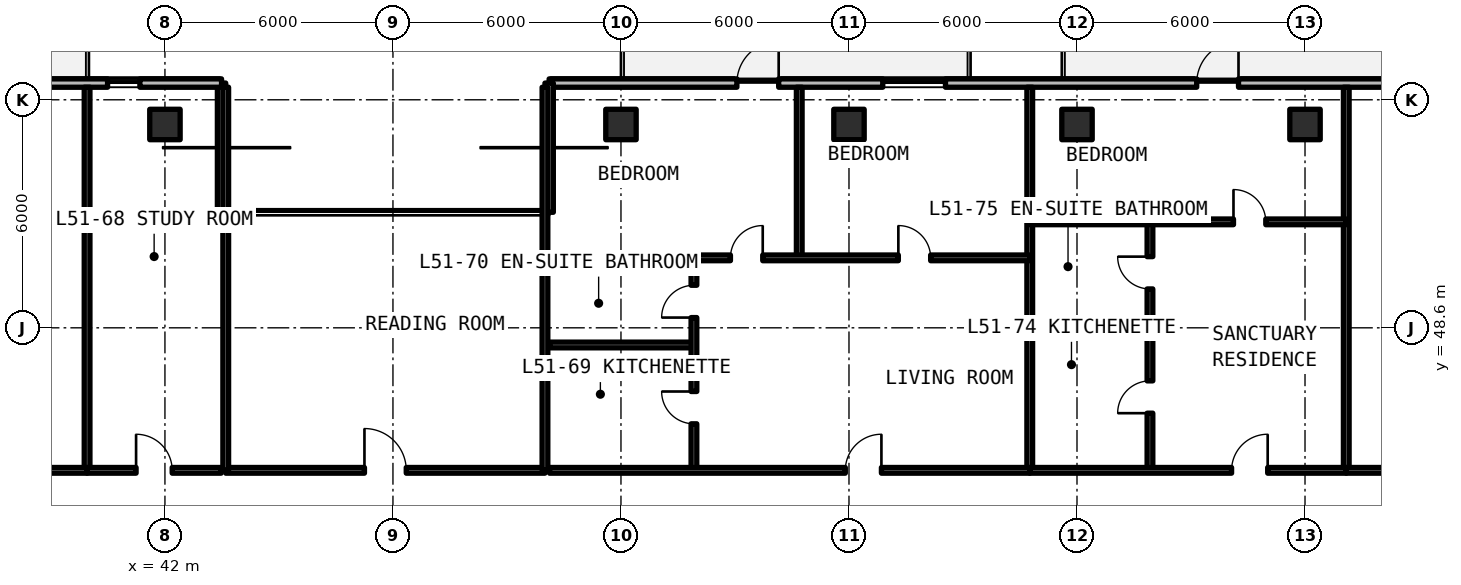
"""IFC4 building model, lengths in metres.
Left out: names, types, materials, properties, quantities, classifications, styles, units other than length and angle.
Written with IfcOpenShell. Run it as: python <this file> out.ifc"""

import sys

from ifc_helpers import new_model, si_unit, direction, frame, frame_2d, origin, origin_2d, place, context, subcontext, project, spatial, rectangle, extrude, element, fill, save


model = new_model("IFC4")
c1 = context("Model", 3, precision=1e-05, world=origin(), true_north=direction((0.0, 1.0)))
c2 = subcontext(c1, "Body", "Model", "MODEL_VIEW")
j1 = project(units=[si_unit("LENGTHUNIT", "METRE"), si_unit("PLANEANGLEUNIT", "RADIAN")], contexts=[c1])
p1 = place(None, origin())
s1 = spatial("IfcSite", under=j1, at=p1, CompositionType="ELEMENT")
p2 = place(p1, origin())
s2 = spatial("IfcBuilding", under=s1, at=p2, CompositionType="ELEMENT")
p3 = place(p2, frame((0.0, 0.0, 185.13)))
s3 = spatial("IfcBuildingStorey", under=s2, at=p3, CompositionType="ELEMENT", Elevation=185.13)
for number, where, z_axis, x_axis in (
    (1, (42.0, 53.95, 0.0), (0.0, 0.0, 1.0), (1.0, 0.0, 0.0)),
    (2, (54.0, 53.95, 0.0), (0.0, 0.0, 1.0), (1.0, 0.0, 0.0)),
    (3, (60.0, 53.95, 0.0), (0.0, 0.0, 1.0), (1.0, 0.0, 0.0)),
    (4, (66.0, 53.95, 0.0), (0.0, 0.0, 1.0), (1.0, 0.0, 0.0)),
    (5, (72.0, 53.95, 0.0), (0.0, 0.0, 1.0), (1.0, 0.0, 0.0)),
):
    element("IfcColumn", number, at=place(p3, frame(where, z_axis=z_axis, x_axis=x_axis)), inside=s3, PredefinedType="COLUMN", context=c2, shape_type="SweptSolid", body=[
        extrude(rectangle(XDim=0.8, YDim=0.8, at=origin_2d()), origin(), (0.0, 0.0, 1.0), 3.3),
    ])
p4 = place(p3, frame((95.354, 55.04, 0.0), z_axis=(0.0, 0.0, 1.0), x_axis=(-1.0, 0.0, 0.0)))
e6 = element("IfcWall", 6, at=p4, inside=s3, PredefinedType="SOLIDWALL", context=c2, shape_type="SweptSolid", body=[
    extrude(rectangle(XDim=43.244, YDim=0.22, at=frame_2d((21.622, 0.0))), origin(), (0.0, 0.0, 1.0), 3.08),
])
p5 = place(p4, frame((37.204, 0.0, 0.0)))
e7 = element("IfcOpeningElement", 7, at=p5, cuts=e6, PredefinedType="OPENING", context=c2, shape_type="SweptSolid", body=[
    extrude(rectangle(XDim=1.1, YDim=2.15, at=frame_2d((0.55, 1.075))), frame((0.0, 0.12, 0.0), z_axis=(0.0, -1.0, 0.0), x_axis=(1.0, 0.0, 0.0)), (0.0, 0.0, 1.0), 0.24),
])
p6 = place(p4, frame((25.104, 0.0, 0.0)))
e8 = element("IfcOpeningElement", 8, at=p6, cuts=e6, PredefinedType="OPENING", context=c2, shape_type="SweptSolid", body=[
    extrude(rectangle(XDim=1.1, YDim=2.15, at=frame_2d((0.55, 1.075))), frame((0.0, 0.12, 0.0), z_axis=(0.0, -1.0, 0.0), x_axis=(1.0, 0.0, 0.0)), (0.0, 0.0, 1.0), 0.24),
])
p7 = place(p4, frame((13.254, 0.0, 0.0)))
e9 = element("IfcOpeningElement", 9, at=p7, cuts=e6, PredefinedType="OPENING", context=c2, shape_type="SweptSolid", body=[
    extrude(rectangle(XDim=1.1, YDim=2.15, at=frame_2d((0.55, 1.075))), frame((0.0, 0.12, 0.0), z_axis=(0.0, -1.0, 0.0), x_axis=(1.0, 0.0, 0.0)), (0.0, 0.0, 1.0), 0.24),
])
p8 = place(p4, frame((32.815, 0.0, 0.78)))
e10 = element("IfcOpeningElement", 10, at=p8, cuts=e6, PredefinedType="OPENING", context=c2, shape_type="SweptSolid", body=[
    extrude(rectangle(XDim=1.65, YDim=1.66, at=frame_2d((0.825, 0.83))), frame((0.0, 0.12, 0.0), z_axis=(0.0, -1.0, 0.0), x_axis=(1.0, 0.0, 0.0)), (0.0, 0.0, 1.0), 0.24),
])
p9 = place(p4, frame((8.458, 0.0, 0.78)))
e11 = element("IfcOpeningElement", 11, at=p9, cuts=e6, PredefinedType="OPENING", context=c2, shape_type="SweptSolid", body=[
    extrude(rectangle(XDim=1.65, YDim=1.66, at=frame_2d((0.825, 0.83))), frame((0.0, 0.12, 0.0), z_axis=(0.0, -1.0, 0.0), x_axis=(1.0, 0.0, 0.0)), (0.0, 0.0, 1.0), 0.24),
])
p10 = place(p4, frame((2.303, 0.0, 0.78)))
e12 = element("IfcOpeningElement", 12, at=p10, cuts=e6, PredefinedType="OPENING", context=c2, shape_type="SweptSolid", body=[
    extrude(rectangle(XDim=1.65, YDim=1.66, at=frame_2d((0.825, 0.83))), frame((0.0, 0.12, 0.0), z_axis=(0.0, -1.0, 0.0), x_axis=(1.0, 0.0, 0.0)), (0.0, 0.0, 1.0), 0.24),
])
for number, where, z_axis, x_axis in (
    (13, (52.11, 55.04, 0.0), (0.0, 0.0, 1.0), (0.0, -1.0, 0.0)),
    (14, (43.49, 51.64, 0.0), (0.0, 0.0, 1.0), (0.0, 1.0, 0.0)),
):
    element("IfcWall", number, at=place(p3, frame(where, z_axis=z_axis, x_axis=x_axis)), inside=s3, PredefinedType="SOLIDWALL", context=c2, shape_type="SweptSolid", body=[
        extrude(rectangle(XDim=3.4, YDim=0.22, at=frame_2d((1.7, 0.0))), origin(), (0.0, 0.0, 1.0), 3.08),
    ])
p11 = place(p3, frame((43.49, 55.04, 0.0), z_axis=(0.0, 0.0, 1.0), x_axis=(-1.0, 0.0, 0.0)))
e15 = element("IfcWall", 15, at=p11, inside=s3, PredefinedType="SOLIDWALL", context=c2, shape_type="SweptSolid", body=[
    extrude(rectangle(XDim=17.644, YDim=0.22, at=frame_2d((8.822, 0.0))), origin(), (0.0, 0.0, 1.0), 3.08),
])
p12 = place(p11, frame((10.29, 0.0, 0.0)))
e16 = element("IfcOpeningElement", 16, at=p12, cuts=e15, PredefinedType="OPENING", context=c2, shape_type="SweptSolid", body=[
    extrude(rectangle(XDim=1.1, YDim=2.15, at=frame_2d((0.55, 1.075))), frame((0.0, 0.12, 0.0), z_axis=(0.0, -1.0, 0.0), x_axis=(1.0, 0.0, 0.0)), (0.0, 0.0, 1.0), 0.24),
])
p13 = place(p11, frame((14.901, 0.0, 0.78)))
e17 = element("IfcOpeningElement", 17, at=p13, cuts=e15, PredefinedType="OPENING", context=c2, shape_type="SweptSolid", body=[
    extrude(rectangle(XDim=1.65, YDim=1.66, at=frame_2d((0.825, 0.83))), frame((0.0, 0.12, 0.0), z_axis=(0.0, -1.0, 0.0), x_axis=(1.0, 0.0, 0.0)), (0.0, 0.0, 1.0), 0.24),
])
p14 = place(p11, frame((4.969, 0.0, 0.78)))
e18 = element("IfcOpeningElement", 18, at=p14, cuts=e15, PredefinedType="OPENING", context=c2, shape_type="SweptSolid", body=[
    extrude(rectangle(XDim=1.65, YDim=1.66, at=frame_2d((0.825, 0.83))), frame((0.0, 0.12, 0.0), z_axis=(0.0, -1.0, 0.0), x_axis=(1.0, 0.0, 0.0)), (0.0, 0.0, 1.0), 0.24),
])
p15 = place(p11, frame((2.149, 0.0, 0.78)))
e19 = element("IfcOpeningElement", 19, at=p15, cuts=e15, PredefinedType="OPENING", context=c2, shape_type="SweptSolid", body=[
    extrude(rectangle(XDim=0.85, YDim=1.65, at=frame_2d((0.425, 0.825))), frame((0.0, 0.12, 0.0), z_axis=(0.0, -1.0, 0.0), x_axis=(1.0, 0.0, 0.0)), (0.0, 0.0, 1.0), 0.24),
])
p16 = place(p3, frame((43.6, 44.85, 0.0), z_axis=(0.0, 0.0, 1.0), x_axis=(1.0, 0.0, 0.0)))
e20 = element("IfcWall", 20, at=p16, inside=s3, PredefinedType="SOLIDWALL", context=c2, shape_type="SweptSolid", body=[
    extrude(rectangle(XDim=8.4, YDim=0.15, at=frame_2d((4.2, 0.0))), origin(), (0.0, 0.0, 1.0), 2.35),
])
p17 = place(p16, frame((3.65, 0.0, 0.0)))
e21 = element("IfcOpeningElement", 21, at=p17, cuts=e20, PredefinedType="OPENING", context=c2, shape_type="SweptSolid", body=[
    extrude(rectangle(XDim=1.1, YDim=2.15, at=frame_2d((0.55, 1.075))), frame((0.0, 0.085, 0.0), z_axis=(0.0, -1.0, 0.0), x_axis=(1.0, 0.0, 0.0)), (0.0, 0.0, 1.0), 0.17),
])
for number, where, z_axis, x_axis in (
    (22, (43.6, 44.85, 0.0), (0.0, 0.0, 1.0), (0.0, 1.0, 0.0)),
    (23, (52.0, 44.85, 0.0), (0.0, 0.0, 1.0), (0.0, 1.0, 0.0)),
    (24, (39.951, 44.85, 0.0), (0.0, 0.0, 1.0), (0.0, 1.0, 0.0)),
):
    element("IfcWall", number, at=place(p3, frame(where, z_axis=z_axis, x_axis=x_axis)), inside=s3, PredefinedType="SOLIDWALL", context=c2, shape_type="SweptSolid", body=[
        extrude(rectangle(XDim=10.08, YDim=0.15, at=frame_2d((5.04, 0.0))), origin(), (0.0, 0.0, 1.0), 2.35),
    ])
p18 = place(p3, frame((33.842, 44.85, 0.0), z_axis=(0.0, 0.0, 1.0), x_axis=(1.0, 0.0, 0.0)))
e25 = element("IfcWall", 25, at=p18, inside=s3, PredefinedType="SOLIDWALL", context=c2, shape_type="SweptSolid", body=[
    extrude(rectangle(XDim=6.11, YDim=0.15, at=frame_2d((3.055, 0.0))), origin(), (0.0, 0.0, 1.0), 2.35),
])
p19 = place(p18, frame((2.58, 0.0, 0.0)))
e26 = element("IfcOpeningElement", 26, at=p19, cuts=e25, PredefinedType="OPENING", context=c2, shape_type="SweptSolid", body=[
    extrude(rectangle(XDim=0.95, YDim=2.15, at=frame_2d((0.475, 1.075))), frame((0.0, 0.085, 0.0), z_axis=(0.0, -1.0, 0.0), x_axis=(1.0, 0.0, 0.0)), (0.0, 0.0, 1.0), 0.17),
])
p20 = place(p3, frame((39.951, 44.85, 0.0), z_axis=(0.0, 0.0, 1.0), x_axis=(1.0, 0.0, 0.0)))
e27 = element("IfcWall", 27, at=p20, inside=s3, PredefinedType="SOLIDWALL", context=c2, shape_type="SweptSolid", body=[
    extrude(rectangle(XDim=3.529, YDim=0.15, at=frame_2d((1.764, 0.0))), origin(), (0.0, 0.0, 1.0), 2.35),
])
p21 = place(p20, frame((1.289, 0.0, 0.0)))
e28 = element("IfcOpeningElement", 28, at=p21, cuts=e27, PredefinedType="OPENING", context=c2, shape_type="SweptSolid", body=[
    extrude(rectangle(XDim=0.95, YDim=2.15, at=frame_2d((0.475, 1.075))), frame((0.0, 0.085, 0.0), z_axis=(0.0, -1.0, 0.0), x_axis=(1.0, 0.0, 0.0)), (0.0, 0.0, 1.0), 0.17),
])
p22 = place(p3, frame((64.757, 44.85, 0.0), z_axis=(0.0, 0.0, 1.0), x_axis=(0.0, 1.0, 0.0)))
e29 = element("IfcWall", 29, at=p22, inside=s3, PredefinedType="SOLIDWALL", context=c2, shape_type="SweptSolid", body=[
    extrude(rectangle(XDim=10.08, YDim=0.15, at=frame_2d((5.04, 0.0))), origin(), (0.0, 0.0, 1.0), 2.35),
])
p23 = place(p3, frame((52.12, 48.148, 0.0), z_axis=(0.0, 0.0, 1.0), x_axis=(1.0, 0.0, 0.0)))
e30 = element("IfcWall", 30, at=p23, inside=s3, PredefinedType="PARTITIONING", context=c2, shape_type="SweptSolid", body=[
    extrude(rectangle(XDim=3.8, YDim=0.15, at=frame_2d((1.9, 0.0))), origin(), (0.0, 0.0, 1.0), 2.35),
])
p24 = place(p3, frame((55.92, 44.85, 0.0), z_axis=(0.0, 0.0, 1.0), x_axis=(0.0, 1.0, 0.0)))
e31 = element("IfcWall", 31, at=p24, inside=s3, PredefinedType="PARTITIONING", context=c2, shape_type="SweptSolid", body=[
    extrude(rectangle(XDim=5.591, YDim=0.15, at=frame_2d((2.795, 0.0))), origin(), (0.0, 0.0, 1.0), 2.35),
])
p25 = place(p24, frame((1.224, 0.0, 0.0)))
e32 = element("IfcOpeningElement", 32, at=p25, cuts=e31, PredefinedType="OPENING", context=c2, shape_type="SweptSolid", body=[
    extrude(rectangle(XDim=0.85, YDim=2.1, at=frame_2d((0.425, 1.05))), frame((0.0, 0.085, 0.0), z_axis=(0.0, -1.0, 0.0), x_axis=(1.0, 0.0, 0.0)), (0.0, 0.0, 1.0), 0.17),
])
p26 = place(p24, frame((4.02, 0.0, 0.0)))
e33 = element("IfcOpeningElement", 33, at=p26, cuts=e31, PredefinedType="OPENING", context=c2, shape_type="SweptSolid", body=[
    extrude(rectangle(XDim=0.85, YDim=2.1, at=frame_2d((0.425, 1.05))), frame((0.0, 0.085, 0.0), z_axis=(0.0, -1.0, 0.0), x_axis=(1.0, 0.0, 0.0)), (0.0, 0.0, 1.0), 0.17),
])
p27 = place(p3, frame((58.691, 50.441, 0.0), z_axis=(0.0, 0.0, 1.0), x_axis=(0.0, 1.0, 0.0)))
e34 = element("IfcWall", 34, at=p27, inside=s3, PredefinedType="PARTITIONING", context=c2, shape_type="SweptSolid", body=[
    extrude(rectangle(XDim=4.489, YDim=0.15, at=frame_2d((2.245, 0.0))), origin(), (0.0, 0.0, 1.0), 2.35),
])
p28 = place(p3, frame((52.12, 50.441, 0.0), z_axis=(0.0, 0.0, 1.0), x_axis=(1.0, 0.0, 0.0)))
e35 = element("IfcWall", 35, at=p28, inside=s3, PredefinedType="PARTITIONING", context=c2, shape_type="SweptSolid", body=[
    extrude(rectangle(XDim=12.637, YDim=0.15, at=frame_2d((6.318, 0.0))), origin(), (0.0, 0.0, 1.0), 2.35),
])
p29 = place(p28, frame((4.76, 0.0, 0.0)))
e36 = element("IfcOpeningElement", 36, at=p29, cuts=e35, PredefinedType="OPENING", context=c2, shape_type="SweptSolid", body=[
    extrude(rectangle(XDim=0.85, YDim=2.1, at=frame_2d((0.425, 1.05))), frame((0.0, 0.085, 0.0), z_axis=(0.0, -1.0, 0.0), x_axis=(1.0, 0.0, 0.0)), (0.0, 0.0, 1.0), 0.17),
])
p30 = place(p28, frame((9.179, 0.0, 0.0)))
e37 = element("IfcOpeningElement", 37, at=p30, cuts=e35, PredefinedType="OPENING", context=c2, shape_type="SweptSolid", body=[
    extrude(rectangle(XDim=0.85, YDim=2.1, at=frame_2d((0.425, 1.05))), frame((0.0, 0.085, 0.0), z_axis=(0.0, -1.0, 0.0), x_axis=(1.0, 0.0, 0.0)), (0.0, 0.0, 1.0), 0.17),
])
p31 = place(p3, frame((52.12, 44.85, 0.0), z_axis=(0.0, 0.0, 1.0), x_axis=(1.0, 0.0, 0.0)))
e38 = element("IfcWall", 38, at=p31, inside=s3, PredefinedType="SOLIDWALL", context=c2, shape_type="SweptSolid", body=[
    extrude(rectangle(XDim=12.637, YDim=0.15, at=frame_2d((6.318, 0.0))), origin(), (0.0, 0.0, 1.0), 2.35),
])
p32 = place(p31, frame((7.783, 0.0, 0.0)))
e39 = element("IfcOpeningElement", 39, at=p32, cuts=e38, PredefinedType="OPENING", context=c2, shape_type="SweptSolid", body=[
    extrude(rectangle(XDim=0.95, YDim=2.15, at=frame_2d((0.475, 1.075))), frame((0.0, 0.085, 0.0), z_axis=(0.0, -1.0, 0.0), x_axis=(1.0, 0.0, 0.0)), (0.0, 0.0, 1.0), 0.17),
])
p33 = place(p3, frame((73.086, 44.85, 0.0), z_axis=(0.0, 0.0, 1.0), x_axis=(0.0, 1.0, 0.0)))
e40 = element("IfcWall", 40, at=p33, inside=s3, PredefinedType="SOLIDWALL", context=c2, shape_type="SweptSolid", body=[
    extrude(rectangle(XDim=10.08, YDim=0.15, at=frame_2d((5.04, 0.0))), origin(), (0.0, 0.0, 1.0), 2.35),
])
p34 = place(p3, frame((64.757, 48.708, 0.0), z_axis=(0.0, 0.0, 1.0), x_axis=(1.0, 0.0, 0.0)))
e41 = element("IfcWall", 41, at=p34, inside=s3, PredefinedType="PARTITIONING", context=c2, shape_type="SweptSolid", body=[
    extrude(rectangle(XDim=3.163, YDim=0.15, at=frame_2d((1.582, 0.0))), origin(), (0.0, 0.0, 1.0), 2.35),
])
p35 = place(p3, frame((67.92, 44.85, 0.0), z_axis=(0.0, 0.0, 1.0), x_axis=(0.0, 1.0, 0.0)))
e42 = element("IfcWall", 42, at=p35, inside=s3, PredefinedType="PARTITIONING", context=c2, shape_type="SweptSolid", body=[
    extrude(rectangle(XDim=6.538, YDim=0.15, at=frame_2d((3.269, 0.0))), origin(), (0.0, 0.0, 1.0), 2.35),
])
p36 = place(p35, frame((1.504, 0.0, 0.0)))
e43 = element("IfcOpeningElement", 43, at=p36, cuts=e42, PredefinedType="OPENING", context=c2, shape_type="SweptSolid", body=[
    extrude(rectangle(XDim=0.85, YDim=2.1, at=frame_2d((0.425, 1.05))), frame((0.0, 0.085, 0.0), z_axis=(0.0, -1.0, 0.0), x_axis=(1.0, 0.0, 0.0)), (0.0, 0.0, 1.0), 0.17),
])
p37 = place(p35, frame((4.773, 0.0, 0.0)))
e44 = element("IfcOpeningElement", 44, at=p37, cuts=e42, PredefinedType="OPENING", context=c2, shape_type="SweptSolid", body=[
    extrude(rectangle(XDim=0.85, YDim=2.1, at=frame_2d((0.425, 1.05))), frame((0.0, 0.085, 0.0), z_axis=(0.0, -1.0, 0.0), x_axis=(1.0, 0.0, 0.0)), (0.0, 0.0, 1.0), 0.17),
])
p38 = place(p3, frame((64.757, 51.388, 0.0), z_axis=(0.0, 0.0, 1.0), x_axis=(1.0, 0.0, 0.0)))
e45 = element("IfcWall", 45, at=p38, inside=s3, PredefinedType="PARTITIONING", context=c2, shape_type="SweptSolid", body=[
    extrude(rectangle(XDim=8.329, YDim=0.15, at=frame_2d((4.165, 0.0))), origin(), (0.0, 0.0, 1.0), 2.35),
])
p39 = place(p38, frame((5.361, 0.0, 0.0)))
e46 = element("IfcOpeningElement", 46, at=p39, cuts=e45, PredefinedType="OPENING", context=c2, shape_type="SweptSolid", body=[
    extrude(rectangle(XDim=0.85, YDim=2.1, at=frame_2d((0.425, 1.05))), frame((0.0, 0.085, 0.0), z_axis=(0.0, -1.0, 0.0), x_axis=(1.0, 0.0, 0.0)), (0.0, 0.0, 1.0), 0.17),
])
p40 = place(p3, frame((64.757, 44.85, 0.0), z_axis=(0.0, 0.0, 1.0), x_axis=(1.0, 0.0, 0.0)))
e47 = element("IfcWall", 47, at=p40, inside=s3, PredefinedType="SOLIDWALL", context=c2, shape_type="SweptSolid", body=[
    extrude(rectangle(XDim=8.329, YDim=0.15, at=frame_2d((4.165, 0.0))), origin(), (0.0, 0.0, 1.0), 2.35),
])
p41 = place(p40, frame((5.311, 0.0, 0.0)))
e48 = element("IfcOpeningElement", 48, at=p41, cuts=e47, PredefinedType="OPENING", context=c2, shape_type="SweptSolid", body=[
    extrude(rectangle(XDim=0.95, YDim=2.15, at=frame_2d((0.475, 1.075))), frame((0.0, 0.085, 0.0), z_axis=(0.0, -1.0, 0.0), x_axis=(1.0, 0.0, 0.0)), (0.0, 0.0, 1.0), 0.17),
])
p42 = place(p3, frame((73.086, 44.85, 0.0), z_axis=(0.0, 0.0, 1.0), x_axis=(1.0, 0.0, 0.0)))
e49 = element("IfcWall", 49, at=p42, inside=s3, PredefinedType="SOLIDWALL", context=c2, shape_type="SweptSolid", body=[
    extrude(rectangle(XDim=9.765, YDim=0.15, at=frame_2d((4.882, 0.0))), origin(), (0.0, 0.0, 1.0), 2.35),
])
p43 = place(p42, frame((4.333, 0.0, 0.0)))
e50 = element("IfcOpeningElement", 50, at=p43, cuts=e49, PredefinedType="OPENING", context=c2, shape_type="SweptSolid", body=[
    extrude(rectangle(XDim=1.1, YDim=2.15, at=frame_2d((0.55, 1.075))), frame((0.0, 0.085, 0.0), z_axis=(0.0, -1.0, 0.0), x_axis=(1.0, 0.0, 0.0)), (0.0, 0.0, 1.0), 0.17),
])
p44 = place(p5, frame((1.1, 0.0, 0.0), z_axis=(0.0, 0.0, 1.0), x_axis=(-1.0, 0.0, 0.0)))
e51 = element("IfcDoor", 51, at=p44, inside=s3, OperationType="SINGLE_SWING_RIGHT", PredefinedType="DOOR", context=c2, shape_type="SweptSolid", body=[
    extrude(rectangle(XDim=1.1, YDim=2.15, at=frame_2d((0.55, 1.075))), frame((0.0, 0.025, 0.0), z_axis=(0.0, -1.0, 0.0), x_axis=(1.0, 0.0, 0.0)), (0.0, 0.0, 1.0), 0.05),
])
fill(e7, e51)
p45 = place(p6, frame((1.1, 0.0, 0.0), z_axis=(0.0, 0.0, 1.0), x_axis=(-1.0, 0.0, 0.0)))
e52 = element("IfcDoor", 52, at=p45, inside=s3, OperationType="SINGLE_SWING_LEFT", PredefinedType="DOOR", context=c2, shape_type="SweptSolid", body=[
    extrude(rectangle(XDim=1.1, YDim=2.15, at=frame_2d((0.55, 1.075))), frame((0.0, 0.025, 0.0), z_axis=(0.0, -1.0, 0.0), x_axis=(1.0, 0.0, 0.0)), (0.0, 0.0, 1.0), 0.05),
])
fill(e8, e52)
p46 = place(p8, origin())
e53 = element("IfcWindow", 53, at=p46, inside=s3, PartitioningType="SINGLE_PANEL", PredefinedType="WINDOW", context=c2, shape_type="SweptSolid", body=[
    extrude(rectangle(XDim=1.65, YDim=1.66, at=frame_2d((0.825, 0.83))), frame((0.0, 0.03, 0.0), z_axis=(0.0, -1.0, 0.0), x_axis=(1.0, 0.0, 0.0)), (0.0, 0.0, 1.0), 0.06),
])
fill(e10, e53)
p47 = place(p15, origin())
e54 = element("IfcWindow", 54, at=p47, inside=s3, PartitioningType="SINGLE_PANEL", PredefinedType="WINDOW", context=c2, shape_type="SweptSolid", body=[
    extrude(rectangle(XDim=0.85, YDim=1.65, at=frame_2d((0.425, 0.825))), frame((0.0, 0.03, 0.0), z_axis=(0.0, -1.0, 0.0), x_axis=(1.0, 0.0, 0.0)), (0.0, 0.0, 1.0), 0.06),
])
fill(e19, e54)
p48 = place(p17, origin())
e55 = element("IfcDoor", 55, at=p48, inside=s3, OperationType="SINGLE_SWING_LEFT", PredefinedType="DOOR", context=c2, shape_type="SweptSolid", body=[
    extrude(rectangle(XDim=1.1, YDim=2.15, at=frame_2d((0.55, 1.075))), frame((0.0, 0.025, 0.0), z_axis=(0.0, -1.0, 0.0), x_axis=(1.0, 0.0, 0.0)), (0.0, 0.0, 1.0), 0.05),
])
fill(e21, e55)
p49 = place(p21, origin())
e56 = element("IfcDoor", 56, at=p49, inside=s3, OperationType="SINGLE_SWING_LEFT", PredefinedType="DOOR", context=c2, shape_type="SweptSolid", body=[
    extrude(rectangle(XDim=0.95, YDim=2.15, at=frame_2d((0.475, 1.075))), frame((0.0, 0.025, 0.0), z_axis=(0.0, -1.0, 0.0), x_axis=(1.0, 0.0, 0.0)), (0.0, 0.0, 1.0), 0.05),
])
fill(e28, e56)
p50 = place(p25, origin())
e57 = element("IfcDoor", 57, at=p50, inside=s3, OperationType="SINGLE_SWING_RIGHT", PredefinedType="DOOR", context=c2, shape_type="SweptSolid", body=[
    extrude(rectangle(XDim=0.85, YDim=2.1, at=frame_2d((0.425, 1.05))), frame((0.0, 0.025, 0.0), z_axis=(0.0, -1.0, 0.0), x_axis=(1.0, 0.0, 0.0)), (0.0, 0.0, 1.0), 0.05),
])
fill(e32, e57)
p51 = place(p26, origin())
e58 = element("IfcDoor", 58, at=p51, inside=s3, OperationType="SINGLE_SWING_LEFT", PredefinedType="DOOR", context=c2, shape_type="SweptSolid", body=[
    extrude(rectangle(XDim=0.85, YDim=2.1, at=frame_2d((0.425, 1.05))), frame((0.0, 0.025, 0.0), z_axis=(0.0, -1.0, 0.0), x_axis=(1.0, 0.0, 0.0)), (0.0, 0.0, 1.0), 0.05),
])
fill(e33, e58)
p52 = place(p29, origin())
e59 = element("IfcDoor", 59, at=p52, inside=s3, OperationType="SINGLE_SWING_RIGHT", PredefinedType="DOOR", context=c2, shape_type="SweptSolid", body=[
    extrude(rectangle(XDim=0.85, YDim=2.1, at=frame_2d((0.425, 1.05))), frame((0.0, 0.025, 0.0), z_axis=(0.0, -1.0, 0.0), x_axis=(1.0, 0.0, 0.0)), (0.0, 0.0, 1.0), 0.05),
])
fill(e36, e59)
p53 = place(p30, origin())
e60 = element("IfcDoor", 60, at=p53, inside=s3, OperationType="SINGLE_SWING_LEFT", PredefinedType="DOOR", context=c2, shape_type="SweptSolid", body=[
    extrude(rectangle(XDim=0.85, YDim=2.1, at=frame_2d((0.425, 1.05))), frame((0.0, 0.025, 0.0), z_axis=(0.0, -1.0, 0.0), x_axis=(1.0, 0.0, 0.0)), (0.0, 0.0, 1.0), 0.05),
])
fill(e37, e60)
p54 = place(p32, origin())
e61 = element("IfcDoor", 61, at=p54, inside=s3, OperationType="SINGLE_SWING_RIGHT", PredefinedType="DOOR", context=c2, shape_type="SweptSolid", body=[
    extrude(rectangle(XDim=0.95, YDim=2.15, at=frame_2d((0.475, 1.075))), frame((0.0, 0.025, 0.0), z_axis=(0.0, -1.0, 0.0), x_axis=(1.0, 0.0, 0.0)), (0.0, 0.0, 1.0), 0.05),
])
fill(e39, e61)
p55 = place(p36, origin())
e62 = element("IfcDoor", 62, at=p55, inside=s3, OperationType="SINGLE_SWING_LEFT", PredefinedType="DOOR", context=c2, shape_type="SweptSolid", body=[
    extrude(rectangle(XDim=0.85, YDim=2.1, at=frame_2d((0.425, 1.05))), frame((0.0, 0.025, 0.0), z_axis=(0.0, -1.0, 0.0), x_axis=(1.0, 0.0, 0.0)), (0.0, 0.0, 1.0), 0.05),
])
fill(e43, e62)
p56 = place(p37, origin())
e63 = element("IfcDoor", 63, at=p56, inside=s3, OperationType="SINGLE_SWING_RIGHT", PredefinedType="DOOR", context=c2, shape_type="SweptSolid", body=[
    extrude(rectangle(XDim=0.85, YDim=2.1, at=frame_2d((0.425, 1.05))), frame((0.0, 0.025, 0.0), z_axis=(0.0, -1.0, 0.0), x_axis=(1.0, 0.0, 0.0)), (0.0, 0.0, 1.0), 0.05),
])
fill(e44, e63)
p57 = place(p39, origin())
e64 = element("IfcDoor", 64, at=p57, inside=s3, OperationType="SINGLE_SWING_LEFT", PredefinedType="DOOR", context=c2, shape_type="SweptSolid", body=[
    extrude(rectangle(XDim=0.85, YDim=2.1, at=frame_2d((0.425, 1.05))), frame((0.0, 0.025, 0.0), z_axis=(0.0, -1.0, 0.0), x_axis=(1.0, 0.0, 0.0)), (0.0, 0.0, 1.0), 0.05),
])
fill(e46, e64)
p58 = place(p41, origin())
e65 = element("IfcDoor", 65, at=p58, inside=s3, OperationType="SINGLE_SWING_RIGHT", PredefinedType="DOOR", context=c2, shape_type="SweptSolid", body=[
    extrude(rectangle(XDim=0.95, YDim=2.15, at=frame_2d((0.475, 1.075))), frame((0.0, 0.025, 0.0), z_axis=(0.0, -1.0, 0.0), x_axis=(1.0, 0.0, 0.0)), (0.0, 0.0, 1.0), 0.05),
])
fill(e48, e65)
save(model, sys.argv[1])
